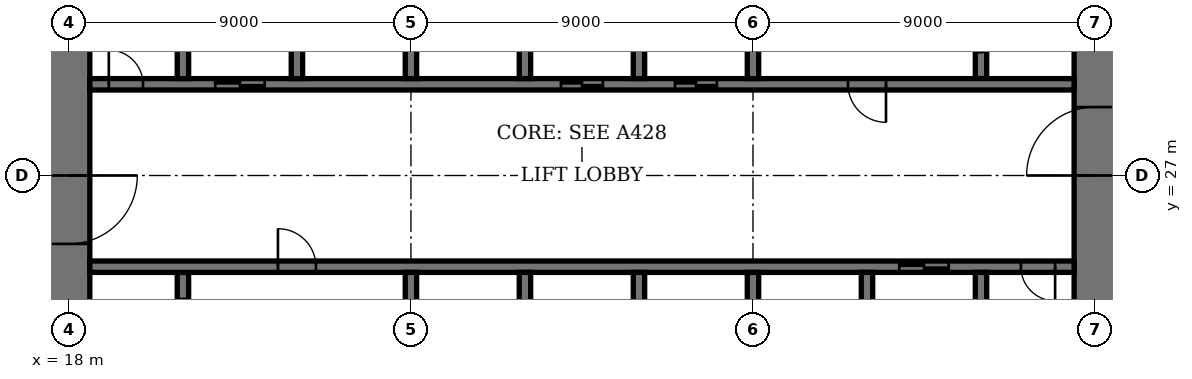
"""IFC4 building model, lengths in metres.
Left out: names, types, materials, properties, quantities, classifications, styles, units other than length and angle.
Written with IfcOpenShell. Run it as: python <this file> out.ifc"""

import sys

from ifc_helpers import new_model, si_unit, direction, frame, frame_2d, origin, place, context, subcontext, project, spatial, rectangle, extrude, element, fill, save


model = new_model("IFC4")
c1 = context("Model", 3, precision=1e-05, world=origin(), true_north=direction((0.0, 1.0)))
c2 = subcontext(c1, "Body", "Model", "MODEL_VIEW")
j1 = project(units=[si_unit("LENGTHUNIT", "METRE"), si_unit("PLANEANGLEUNIT", "RADIAN")], contexts=[c1])
p1 = place(None, origin())
s1 = spatial("IfcSite", under=j1, at=p1, CompositionType="ELEMENT")
p2 = place(p1, origin())
s2 = spatial("IfcBuilding", under=s1, at=p2, CompositionType="ELEMENT")
p3 = place(p2, frame((0.0, 0.0, 97.0)))
s3 = spatial("IfcBuildingStorey", under=s2, at=p3, CompositionType="ELEMENT", Elevation=97.0)
p4 = place(p3, frame((18.0, 35.45, 0.0), z_axis=(0.0, 0.0, 1.0), x_axis=(0.0, -1.0, 0.0)))
e1 = element("IfcWall", 1, at=p4, inside=s3, PredefinedType="SHEAR", context=c2, shape_type="SweptSolid", body=[
    extrude(rectangle(XDim=16.9, YDim=1.1, at=frame_2d((8.45, 0.0))), origin(), (0.0, 0.0, 1.0), 4.0),
])
p5 = place(p4, frame((8.45, 0.0, 0.0)))
e2 = element("IfcOpeningElement", 2, at=p5, cuts=e1, PredefinedType="OPENING", context=c2, shape_type="SweptSolid", body=[
    extrude(rectangle(XDim=1.8, YDim=2.4, at=frame_2d((0.9, 1.2))), frame((0.0, 0.56, 0.0), z_axis=(0.0, -1.0, 0.0), x_axis=(1.0, 0.0, 0.0)), (0.0, 0.0, 1.0), 1.12),
])
p6 = place(p3, frame((45.0, 18.55, 0.0), z_axis=(0.0, 0.0, 1.0), x_axis=(0.0, 1.0, 0.0)))
e3 = element("IfcWall", 3, at=p6, inside=s3, PredefinedType="SHEAR", context=c2, shape_type="SweptSolid", body=[
    extrude(rectangle(XDim=16.9, YDim=1.1, at=frame_2d((8.45, 0.0))), origin(), (0.0, 0.0, 1.0), 4.0),
])
p7 = place(p6, frame((8.45, 0.0, 0.0)))
e4 = element("IfcOpeningElement", 4, at=p7, cuts=e3, PredefinedType="OPENING", context=c2, shape_type="SweptSolid", body=[
    extrude(rectangle(XDim=1.8, YDim=2.4, at=frame_2d((0.9, 1.2))), frame((0.0, 0.56, 0.0), z_axis=(0.0, -1.0, 0.0), x_axis=(1.0, 0.0, 0.0)), (0.0, 0.0, 1.0), 1.12),
])
p8 = place(p3, frame((21.0, 21.95, 0.0), z_axis=(0.0, 0.0, 1.0), x_axis=(0.0, 1.0, 0.0)))
e5 = element("IfcWall", 5, at=p8, inside=s3, PredefinedType="SHEAR", context=c2, shape_type="SweptSolid", body=[
    extrude(rectangle(XDim=2.5, YDim=0.3, at=frame_2d((1.25, 0.0))), origin(), (0.0, 0.0, 1.0), 4.0),
])
p9 = place(p8, frame((0.7, 0.0, 0.0)))
e6 = element("IfcOpeningElement", 6, at=p9, cuts=e5, PredefinedType="OPENING", context=c2, shape_type="SweptSolid", body=[
    extrude(rectangle(XDim=1.1, YDim=2.4, at=frame_2d((0.55, 1.2))), frame((0.0, 0.16, 0.0), z_axis=(0.0, -1.0, 0.0), x_axis=(1.0, 0.0, 0.0)), (0.0, 0.0, 1.0), 0.32),
])
p10 = place(p3, frame((42.0, 29.55, 0.0), z_axis=(0.0, 0.0, 1.0), x_axis=(0.0, 1.0, 0.0)))
e7 = element("IfcWall", 7, at=p10, inside=s3, PredefinedType="SHEAR", context=c2, shape_type="SweptSolid", body=[
    extrude(rectangle(XDim=2.5, YDim=0.3, at=frame_2d((1.25, 0.0))), origin(), (0.0, 0.0, 1.0), 4.0),
])
p11 = place(p10, frame((0.7, 0.0, 0.0)))
e8 = element("IfcOpeningElement", 8, at=p11, cuts=e7, PredefinedType="OPENING", context=c2, shape_type="SweptSolid", body=[
    extrude(rectangle(XDim=1.1, YDim=2.4, at=frame_2d((0.55, 1.2))), frame((0.0, 0.16, 0.0), z_axis=(0.0, -1.0, 0.0), x_axis=(1.0, 0.0, 0.0)), (0.0, 0.0, 1.0), 0.32),
])
p12 = place(p3, frame((18.55, 24.6, 0.0), z_axis=(0.0, 0.0, 1.0), x_axis=(1.0, 0.0, 0.0)))
e9 = element("IfcWall", 9, at=p12, inside=s3, PredefinedType="SHEAR", context=c2, shape_type="SweptSolid", body=[
    extrude(rectangle(XDim=25.9, YDim=0.3, at=frame_2d((12.95, 0.0))), origin(), (0.0, 0.0, 1.0), 4.0),
])
p13 = place(p12, frame((4.95, 0.0, 0.0)))
e10 = element("IfcOpeningElement", 10, at=p13, cuts=e9, PredefinedType="OPENING", context=c2, shape_type="SweptSolid", body=[
    extrude(rectangle(XDim=1.0, YDim=2.4, at=frame_2d((0.5, 1.2))), frame((0.0, 0.16, 0.0), z_axis=(0.0, -1.0, 0.0), x_axis=(1.0, 0.0, 0.0)), (0.0, 0.0, 1.0), 0.32),
])
p14 = place(p12, frame((24.5, 0.0, 0.0)))
e11 = element("IfcOpeningElement", 11, at=p14, cuts=e9, PredefinedType="OPENING", context=c2, shape_type="SweptSolid", body=[
    extrude(rectangle(XDim=0.9, YDim=2.1, at=frame_2d((0.45, 1.05))), frame((0.0, 0.16, 0.0), z_axis=(0.0, -1.0, 0.0), x_axis=(1.0, 0.0, 0.0)), (0.0, 0.0, 1.0), 0.32),
])
p15 = place(p12, frame((21.3, 0.0, 0.0)))
e12 = element("IfcOpeningElement", 12, at=p15, cuts=e9, PredefinedType="OPENING", context=c2, shape_type="SweptSolid", body=[
    extrude(rectangle(XDim=1.3, YDim=2.4, at=frame_2d((0.65, 1.2))), frame((0.0, 0.16, 0.0), z_axis=(0.0, -1.0, 0.0), x_axis=(1.0, 0.0, 0.0)), (0.0, 0.0, 1.0), 0.32),
])
p16 = place(p3, frame((18.55, 29.4, 0.0), z_axis=(0.0, 0.0, 1.0), x_axis=(1.0, 0.0, 0.0)))
e13 = element("IfcWall", 13, at=p16, inside=s3, PredefinedType="SHEAR", context=c2, shape_type="SweptSolid", body=[
    extrude(rectangle(XDim=25.9, YDim=0.3, at=frame_2d((12.95, 0.0))), origin(), (0.0, 0.0, 1.0), 4.0),
])
p17 = place(p16, frame((19.95, 0.0, 0.0)))
e14 = element("IfcOpeningElement", 14, at=p17, cuts=e13, PredefinedType="OPENING", context=c2, shape_type="SweptSolid", body=[
    extrude(rectangle(XDim=1.0, YDim=2.4, at=frame_2d((0.5, 1.2))), frame((0.0, 0.16, 0.0), z_axis=(0.0, -1.0, 0.0), x_axis=(1.0, 0.0, 0.0)), (0.0, 0.0, 1.0), 0.32),
])
p18 = place(p16, frame((0.5, 0.0, 0.0)))
e15 = element("IfcOpeningElement", 15, at=p18, cuts=e13, PredefinedType="OPENING", context=c2, shape_type="SweptSolid", body=[
    extrude(rectangle(XDim=0.9, YDim=2.1, at=frame_2d((0.45, 1.05))), frame((0.0, 0.16, 0.0), z_axis=(0.0, -1.0, 0.0), x_axis=(1.0, 0.0, 0.0)), (0.0, 0.0, 1.0), 0.32),
])
p19 = place(p16, frame((15.4, 0.0, 0.0)))
e16 = element("IfcOpeningElement", 16, at=p19, cuts=e13, PredefinedType="OPENING", context=c2, shape_type="SweptSolid", body=[
    extrude(rectangle(XDim=1.1, YDim=2.4, at=frame_2d((0.55, 1.2))), frame((0.0, 0.16, 0.0), z_axis=(0.0, -1.0, 0.0), x_axis=(1.0, 0.0, 0.0)), (0.0, 0.0, 1.0), 0.32),
])
p20 = place(p16, frame((12.4, 0.0, 0.0)))
e17 = element("IfcOpeningElement", 17, at=p20, cuts=e13, PredefinedType="OPENING", context=c2, shape_type="SweptSolid", body=[
    extrude(rectangle(XDim=1.1, YDim=2.4, at=frame_2d((0.55, 1.2))), frame((0.0, 0.16, 0.0), z_axis=(0.0, -1.0, 0.0), x_axis=(1.0, 0.0, 0.0)), (0.0, 0.0, 1.0), 0.32),
])
p21 = place(p16, frame((3.3, 0.0, 0.0)))
e18 = element("IfcOpeningElement", 18, at=p21, cuts=e13, PredefinedType="OPENING", context=c2, shape_type="SweptSolid", body=[
    extrude(rectangle(XDim=1.3, YDim=2.4, at=frame_2d((0.65, 1.2))), frame((0.0, 0.16, 0.0), z_axis=(0.0, -1.0, 0.0), x_axis=(1.0, 0.0, 0.0)), (0.0, 0.0, 1.0), 0.32),
])
for number, where, z_axis, x_axis in (
    (19, (30.0, 21.75, 0.0), (0.0, 0.0, 1.0), (0.0, 1.0, 0.0)),
    (20, (33.0, 29.55, 0.0), (0.0, 0.0, 1.0), (0.0, 1.0, 0.0)),
    (21, (33.0, 21.75, 0.0), (0.0, 0.0, 1.0), (0.0, 1.0, 0.0)),
    (22, (30.0, 29.55, 0.0), (0.0, 0.0, 1.0), (0.0, 1.0, 0.0)),
    (23, (36.0, 21.75, 0.0), (0.0, 0.0, 1.0), (0.0, 1.0, 0.0)),
    (24, (27.0, 29.55, 0.0), (0.0, 0.0, 1.0), (0.0, 1.0, 0.0)),
):
    element("IfcWall", number, at=place(p3, frame(where, z_axis=z_axis, x_axis=x_axis)), inside=s3, PredefinedType="SHEAR", context=c2, shape_type="SweptSolid", body=[
        extrude(rectangle(XDim=2.7, YDim=0.3, at=frame_2d((1.35, 0.0))), origin(), (0.0, 0.0, 1.0), 4.0),
    ])
for number, where, z_axis, x_axis in (
    (25, (39.0, 18.55, 0.0), (0.0, 0.0, 1.0), (0.0, 1.0, 0.0)),
    (26, (24.0, 29.55, 0.0), (0.0, 0.0, 1.0), (0.0, 1.0, 0.0)),
):
    element("IfcWall", number, at=place(p3, frame(where, z_axis=z_axis, x_axis=x_axis)), inside=s3, PredefinedType="SHEAR", context=c2, shape_type="SweptSolid", body=[
        extrude(rectangle(XDim=5.9, YDim=0.3, at=frame_2d((2.95, 0.0))), origin(), (0.0, 0.0, 1.0), 4.0),
    ])
for number, where, z_axis, x_axis in (
    (27, (42.0, 21.75, 0.0), (0.0, 0.0, 1.0), (0.0, 1.0, 0.0)),
    (28, (21.0, 29.55, 0.0), (0.0, 0.0, 1.0), (0.0, 1.0, 0.0)),
):
    element("IfcWall", number, at=place(p3, frame(where, z_axis=z_axis, x_axis=x_axis)), inside=s3, PredefinedType="SHEAR", context=c2, shape_type="SweptSolid", body=[
        extrude(rectangle(XDim=2.7, YDim=0.3, at=frame_2d((1.35, 0.0))), origin(), (0.0, 0.0, 1.0), 4.0),
    ])
for number, where, z_axis, x_axis in (
    (29, (27.0, 21.6, 0.0), (0.0, 0.0, 1.0), (0.0, 1.0, 0.0)),
    (30, (36.0, 29.55, 0.0), (0.0, 0.0, 1.0), (0.0, 1.0, 0.0)),
):
    element("IfcWall", number, at=place(p3, frame(where, z_axis=z_axis, x_axis=x_axis)), inside=s3, PredefinedType="SHEAR", context=c2, shape_type="SweptSolid", body=[
        extrude(rectangle(XDim=2.85, YDim=0.3, at=frame_2d((1.425, 0.0))), origin(), (0.0, 0.0, 1.0), 4.0),
    ])
p22 = place(p5, origin())
e31 = element("IfcDoor", 31, at=p22, inside=s3, OperationType="DOUBLE_DOOR_DOUBLE_SWING", PredefinedType="DOOR", context=c2, shape_type="SweptSolid", body=[
    extrude(rectangle(XDim=1.8, YDim=2.4, at=frame_2d((0.9, 1.2))), frame((0.0, 0.03, 0.0), z_axis=(0.0, -1.0, 0.0), x_axis=(1.0, 0.0, 0.0)), (0.0, 0.0, 1.0), 0.06),
    extrude(rectangle(XDim=0.04, YDim=2.4, at=frame_2d((0.02, 1.2))), frame((0.0, 0.55, 0.0), z_axis=(0.0, -1.0, 0.0), x_axis=(1.0, 0.0, 0.0)), (0.0, 0.0, 1.0), 1.1),
    extrude(rectangle(XDim=0.04, YDim=2.4, at=frame_2d((1.78, 1.2))), frame((0.0, 0.55, 0.0), z_axis=(0.0, -1.0, 0.0), x_axis=(1.0, 0.0, 0.0)), (0.0, 0.0, 1.0), 1.1),
    extrude(rectangle(XDim=1.8, YDim=0.04, at=frame_2d((0.9, 2.38))), frame((0.0, 0.55, 0.0), z_axis=(0.0, -1.0, 0.0), x_axis=(1.0, 0.0, 0.0)), (0.0, 0.0, 1.0), 1.1),
])
fill(e2, e31)
p23 = place(p7, origin())
e32 = element("IfcDoor", 32, at=p23, inside=s3, OperationType="DOUBLE_DOOR_DOUBLE_SWING", PredefinedType="DOOR", context=c2, shape_type="SweptSolid", body=[
    extrude(rectangle(XDim=1.8, YDim=2.4, at=frame_2d((0.9, 1.2))), frame((0.0, 0.03, 0.0), z_axis=(0.0, -1.0, 0.0), x_axis=(1.0, 0.0, 0.0)), (0.0, 0.0, 1.0), 0.06),
    extrude(rectangle(XDim=0.04, YDim=2.4, at=frame_2d((0.02, 1.2))), frame((0.0, 0.55, 0.0), z_axis=(0.0, -1.0, 0.0), x_axis=(1.0, 0.0, 0.0)), (0.0, 0.0, 1.0), 1.1),
    extrude(rectangle(XDim=0.04, YDim=2.4, at=frame_2d((1.78, 1.2))), frame((0.0, 0.55, 0.0), z_axis=(0.0, -1.0, 0.0), x_axis=(1.0, 0.0, 0.0)), (0.0, 0.0, 1.0), 1.1),
    extrude(rectangle(XDim=1.8, YDim=0.04, at=frame_2d((0.9, 2.38))), frame((0.0, 0.55, 0.0), z_axis=(0.0, -1.0, 0.0), x_axis=(1.0, 0.0, 0.0)), (0.0, 0.0, 1.0), 1.1),
])
fill(e4, e32)
p24 = place(p13, origin())
e33 = element("IfcDoor", 33, at=p24, inside=s3, OperationType="SINGLE_SWING_RIGHT", PredefinedType="DOOR", context=c2, shape_type="SweptSolid", body=[
    extrude(rectangle(XDim=1.0, YDim=2.4, at=frame_2d((0.5, 1.2))), frame((0.0, 0.03, 0.0), z_axis=(0.0, -1.0, 0.0), x_axis=(1.0, 0.0, 0.0)), (0.0, 0.0, 1.0), 0.06),
])
fill(e10, e33)
p25 = place(p17, origin())
e34 = element("IfcDoor", 34, at=p25, inside=s3, OperationType="SINGLE_SWING_RIGHT", PredefinedType="DOOR", context=c2, shape_type="SweptSolid", body=[
    extrude(rectangle(XDim=1.0, YDim=2.4, at=frame_2d((0.5, 1.2))), frame((0.0, 0.03, 0.0), z_axis=(0.0, -1.0, 0.0), x_axis=(1.0, 0.0, 0.0)), (0.0, 0.0, 1.0), 0.06),
])
fill(e14, e34)
p26 = place(p14, origin())
e35 = element("IfcDoor", 35, at=p26, inside=s3, OperationType="SINGLE_SWING_RIGHT", PredefinedType="DOOR", context=c2, shape_type="SweptSolid", body=[
    extrude(rectangle(XDim=0.9, YDim=2.1, at=frame_2d((0.45, 1.05))), frame((0.0, 0.03, 0.0), z_axis=(0.0, -1.0, 0.0), x_axis=(1.0, 0.0, 0.0)), (0.0, 0.0, 1.0), 0.06),
])
fill(e11, e35)
p27 = place(p18, origin())
e36 = element("IfcDoor", 36, at=p27, inside=s3, OperationType="SINGLE_SWING_RIGHT", PredefinedType="DOOR", context=c2, shape_type="SweptSolid", body=[
    extrude(rectangle(XDim=0.9, YDim=2.1, at=frame_2d((0.45, 1.05))), frame((0.0, 0.03, 0.0), z_axis=(0.0, -1.0, 0.0), x_axis=(1.0, 0.0, 0.0)), (0.0, 0.0, 1.0), 0.06),
])
fill(e15, e36)
p28 = place(p19, origin())
e37 = element("IfcDoor", 37, at=p28, inside=s3, OperationType="DOUBLE_DOOR_SLIDING", PredefinedType="DOOR", context=c2, shape_type="SweptSolid", body=[
    extrude(rectangle(XDim=1.1, YDim=2.4, at=frame_2d((0.55, 1.2))), frame((0.0, 0.02, 0.0), z_axis=(0.0, -1.0, 0.0), x_axis=(1.0, 0.0, 0.0)), (0.0, 0.0, 1.0), 0.04),
])
fill(e16, e37)
p29 = place(p20, origin())
e38 = element("IfcDoor", 38, at=p29, inside=s3, OperationType="DOUBLE_DOOR_SLIDING", PredefinedType="DOOR", context=c2, shape_type="SweptSolid", body=[
    extrude(rectangle(XDim=1.1, YDim=2.4, at=frame_2d((0.55, 1.2))), frame((0.0, 0.02, 0.0), z_axis=(0.0, -1.0, 0.0), x_axis=(1.0, 0.0, 0.0)), (0.0, 0.0, 1.0), 0.04),
])
fill(e17, e38)
p30 = place(p15, origin())
e39 = element("IfcDoor", 39, at=p30, inside=s3, OperationType="DOUBLE_DOOR_SLIDING", PredefinedType="DOOR", context=c2, shape_type="SweptSolid", body=[
    extrude(rectangle(XDim=1.3, YDim=2.4, at=frame_2d((0.65, 1.2))), frame((0.0, 0.02, 0.0), z_axis=(0.0, -1.0, 0.0), x_axis=(1.0, 0.0, 0.0)), (0.0, 0.0, 1.0), 0.04),
])
fill(e12, e39)
p31 = place(p21, origin())
e40 = element("IfcDoor", 40, at=p31, inside=s3, OperationType="DOUBLE_DOOR_SLIDING", PredefinedType="DOOR", context=c2, shape_type="SweptSolid", body=[
    extrude(rectangle(XDim=1.3, YDim=2.4, at=frame_2d((0.65, 1.2))), frame((0.0, 0.02, 0.0), z_axis=(0.0, -1.0, 0.0), x_axis=(1.0, 0.0, 0.0)), (0.0, 0.0, 1.0), 0.04),
])
fill(e18, e40)
save(model, sys.argv[1])
